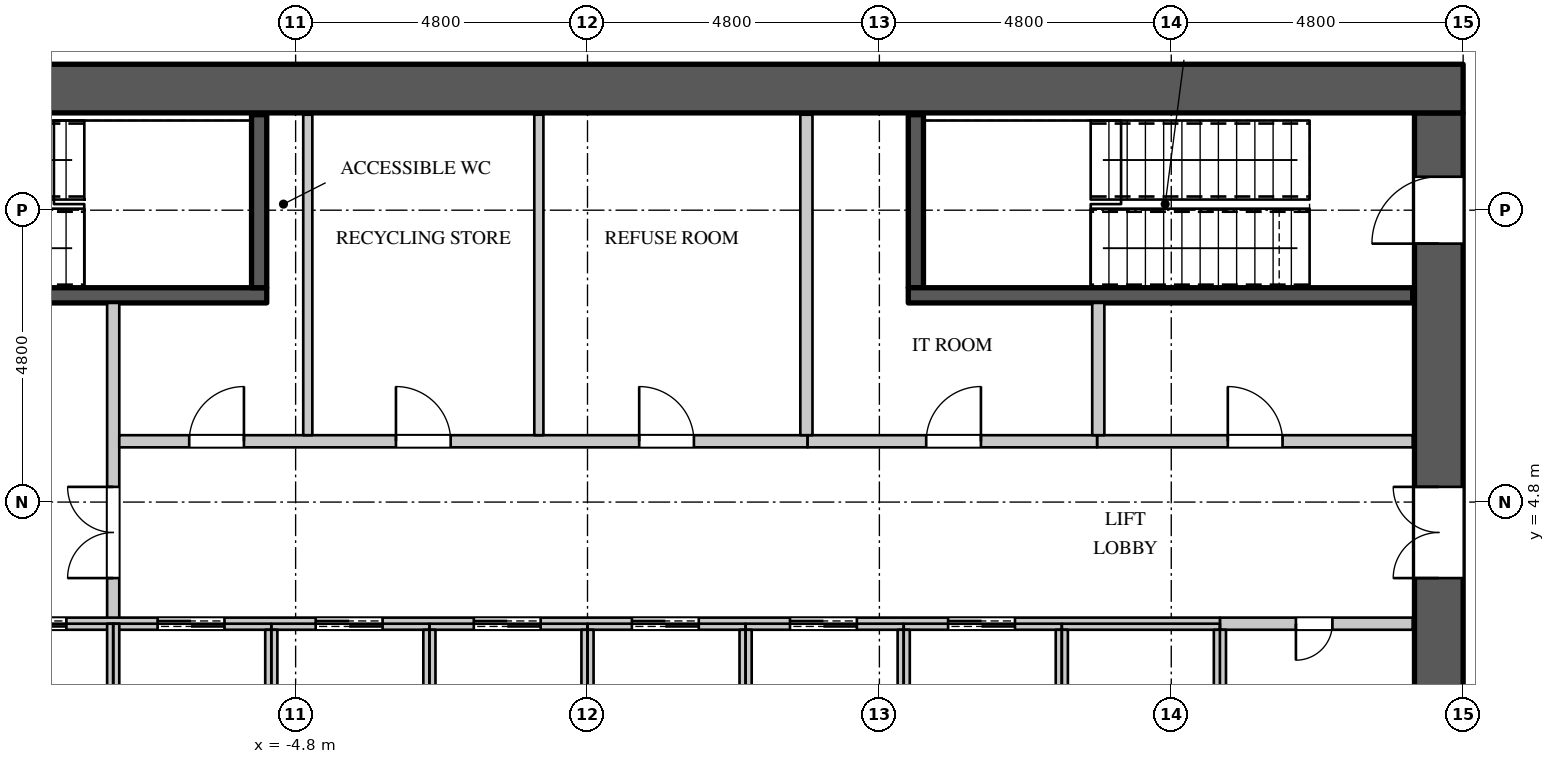
"""IFC4 building model, lengths in metres.
Left out: names, types, materials, properties, quantities, classifications, styles, units other than length and angle.
Written with IfcOpenShell. Run it as: python <this file> out.ifc"""

import sys

from ifc_helpers import new_model, si_unit, direction, frame, frame_2d, origin, place, context, subcontext, project, spatial, rectangle, extrude, element, fill, save


model = new_model("IFC4")
c1 = context("Model", 3, precision=1e-05, world=origin(), true_north=direction((0.0, 1.0)))
c2 = subcontext(c1, "Body", "Model", "MODEL_VIEW")
j1 = project(units=[si_unit("LENGTHUNIT", "METRE"), si_unit("PLANEANGLEUNIT", "RADIAN")], contexts=[c1])
p1 = place(None, origin())
s1 = spatial("IfcSite", under=j1, at=p1, CompositionType="ELEMENT")
p2 = place(p1, origin())
s2 = spatial("IfcBuilding", under=s1, at=p2, CompositionType="ELEMENT")
p3 = place(p2, frame((0.0, 0.0, 119.1)))
s3 = spatial("IfcBuildingStorey", under=s2, at=p3, CompositionType="ELEMENT", Elevation=119.1)
p4 = place(p3, frame((-14.4, 11.6, 0.0), z_axis=(0.0, 0.0, 1.0), x_axis=(1.0, 0.0, 0.0)))
e1 = element("IfcWall", 1, at=p4, inside=s3, PredefinedType="SHEAR", context=c2, shape_type="SweptSolid", body=[
    extrude(rectangle(XDim=28.8, YDim=0.8, at=frame_2d((14.4, 0.0))), origin(), (0.0, 0.0, 1.0), 4.2),
])
p5 = place(p3, frame((14.0, -11.2, 0.0), z_axis=(0.0, 0.0, 1.0), x_axis=(0.0, 1.0, 0.0)))
e2 = element("IfcWall", 2, at=p5, inside=s3, PredefinedType="SHEAR", context=c2, shape_type="SweptSolid", body=[
    extrude(rectangle(XDim=22.4, YDim=0.8, at=frame_2d((11.2, 0.0))), origin(), (0.0, 0.0, 1.0), 4.2),
])
p6 = place(p5, frame((20.25, 0.0, 0.0)))
e3 = element("IfcOpeningElement", 3, at=p6, cuts=e2, PredefinedType="OPENING", context=c2, shape_type="SweptSolid", body=[
    extrude(rectangle(XDim=1.1, YDim=2.2, at=frame_2d((0.55, 1.1))), frame((0.0, 0.41, 0.0), z_axis=(0.0, -1.0, 0.0), x_axis=(1.0, 0.0, 0.0)), (0.0, 0.0, 1.0), 0.82),
])
p7 = place(p5, frame((1.05, 0.0, 0.0)))
e4 = element("IfcOpeningElement", 4, at=p7, cuts=e2, PredefinedType="OPENING", context=c2, shape_type="SweptSolid", body=[
    extrude(rectangle(XDim=1.1, YDim=2.2, at=frame_2d((0.55, 1.1))), frame((0.0, 0.41, 0.0), z_axis=(0.0, -1.0, 0.0), x_axis=(1.0, 0.0, 0.0)), (0.0, 0.0, 1.0), 0.82),
])
p8 = place(p5, frame((14.75, 0.0, 0.0)))
e5 = element("IfcOpeningElement", 5, at=p8, cuts=e2, PredefinedType="OPENING", context=c2, shape_type="SweptSolid", body=[
    extrude(rectangle(XDim=1.5, YDim=2.4, at=frame_2d((0.75, 1.2))), frame((0.0, 0.41, 0.0), z_axis=(0.0, -1.0, 0.0), x_axis=(1.0, 0.0, 0.0)), (0.0, 0.0, 1.0), 0.82),
])
p9 = place(p5, frame((6.15, 0.0, 0.0)))
e6 = element("IfcOpeningElement", 6, at=p9, cuts=e2, PredefinedType="OPENING", context=c2, shape_type="SweptSolid", body=[
    extrude(rectangle(XDim=1.5, YDim=2.4, at=frame_2d((0.75, 1.2))), frame((0.0, 0.41, 0.0), z_axis=(0.0, -1.0, 0.0), x_axis=(1.0, 0.0, 0.0)), (0.0, 0.0, 1.0), 0.82),
])
p10 = place(p3, frame((-7.8, 2.8, 0.0), z_axis=(0.0, 0.0, 1.0), x_axis=(0.0, 1.0, 0.0)))
e7 = element("IfcWall", 7, at=p10, inside=s3, PredefinedType="PARTITIONING", context=c2, shape_type="SweptSolid", body=[
    extrude(rectangle(XDim=5.275, YDim=0.2, at=frame_2d((2.637, 0.0))), origin(), (0.0, 0.0, 1.0), 3.95),
])
p11 = place(p10, frame((0.75, 0.0, 0.0)))
e8 = element("IfcOpeningElement", 8, at=p11, cuts=e7, PredefinedType="OPENING", context=c2, shape_type="SweptSolid", body=[
    extrude(rectangle(XDim=1.5, YDim=2.4, at=frame_2d((0.75, 1.2))), frame((0.0, 0.11, 0.0), z_axis=(0.0, -1.0, 0.0), x_axis=(1.0, 0.0, 0.0)), (0.0, 0.0, 1.0), 0.22),
])
p12 = place(p3, frame((-7.7, 5.8, 0.0), z_axis=(0.0, 0.0, 1.0), x_axis=(1.0, 0.0, 0.0)))
e9 = element("IfcWall", 9, at=p12, inside=s3, PredefinedType="PARTITIONING", context=c2, shape_type="SweptSolid", body=[
    extrude(rectangle(XDim=11.32, YDim=0.2, at=frame_2d((5.66, 0.0))), origin(), (0.0, 0.0, 1.0), 3.95),
])
p13 = place(p12, frame((1.15, 0.0, 0.0)))
e10 = element("IfcOpeningElement", 10, at=p13, cuts=e9, PredefinedType="OPENING", context=c2, shape_type="SweptSolid", body=[
    extrude(rectangle(XDim=0.9, YDim=2.2, at=frame_2d((0.45, 1.1))), frame((0.0, 0.11, 0.0), z_axis=(0.0, -1.0, 0.0), x_axis=(1.0, 0.0, 0.0)), (0.0, 0.0, 1.0), 0.22),
])
p14 = place(p12, frame((4.55, 0.0, 0.0)))
e11 = element("IfcOpeningElement", 11, at=p14, cuts=e9, PredefinedType="OPENING", context=c2, shape_type="SweptSolid", body=[
    extrude(rectangle(XDim=0.9, YDim=2.2, at=frame_2d((0.45, 1.1))), frame((0.0, 0.11, 0.0), z_axis=(0.0, -1.0, 0.0), x_axis=(1.0, 0.0, 0.0)), (0.0, 0.0, 1.0), 0.22),
])
p15 = place(p12, frame((8.55, 0.0, 0.0)))
e12 = element("IfcOpeningElement", 12, at=p15, cuts=e9, PredefinedType="OPENING", context=c2, shape_type="SweptSolid", body=[
    extrude(rectangle(XDim=0.9, YDim=2.2, at=frame_2d((0.45, 1.1))), frame((0.0, 0.11, 0.0), z_axis=(0.0, -1.0, 0.0), x_axis=(1.0, 0.0, 0.0)), (0.0, 0.0, 1.0), 0.22),
])
p16 = place(p3, frame((8.38, 5.8, 0.0), z_axis=(0.0, 0.0, 1.0), x_axis=(1.0, 0.0, 0.0)))
e13 = element("IfcWall", 13, at=p16, inside=s3, PredefinedType="PARTITIONING", context=c2, shape_type="SweptSolid", body=[
    extrude(rectangle(XDim=5.19, YDim=0.2, at=frame_2d((2.595, 0.0))), origin(), (0.0, 0.0, 1.0), 3.95),
])
p17 = place(p16, frame((2.15, 0.0, 0.0)))
e14 = element("IfcOpeningElement", 14, at=p17, cuts=e13, PredefinedType="OPENING", context=c2, shape_type="SweptSolid", body=[
    extrude(rectangle(XDim=0.9, YDim=2.2, at=frame_2d((0.45, 1.1))), frame((0.0, 0.11, 0.0), z_axis=(0.0, -1.0, 0.0), x_axis=(1.0, 0.0, 0.0)), (0.0, 0.0, 1.0), 0.22),
])
for number, where, z_axis, x_axis in (
    (15, (-4.6, 5.9, 0.0), (0.0, 0.0, 1.0), (0.0, 1.0, 0.0)),
    (16, (-0.8, 5.9, 0.0), (0.0, 0.0, 1.0), (0.0, 1.0, 0.0)),
):
    element("IfcWall", number, at=place(p3, frame(where, z_axis=z_axis, x_axis=x_axis)), inside=s3, PredefinedType="PARTITIONING", context=c2, shape_type="SweptSolid", body=[
        extrude(rectangle(XDim=5.27, YDim=0.15, at=frame_2d((2.635, 0.0))), origin(), (0.0, 0.0, 1.0), 3.95),
    ])
p18 = place(p3, frame((3.62, 5.8, 0.0), z_axis=(0.0, 0.0, 1.0), x_axis=(1.0, 0.0, 0.0)))
e17 = element("IfcWall", 17, at=p18, inside=s3, PredefinedType="PARTITIONING", context=c2, shape_type="SweptSolid", body=[
    extrude(rectangle(XDim=4.76, YDim=0.2, at=frame_2d((2.38, 0.0))), origin(), (0.0, 0.0, 1.0), 3.95),
])
p19 = place(p18, frame((1.95, 0.0, 0.0)))
e18 = element("IfcOpeningElement", 18, at=p19, cuts=e17, PredefinedType="OPENING", context=c2, shape_type="SweptSolid", body=[
    extrude(rectangle(XDim=0.9, YDim=2.2, at=frame_2d((0.45, 1.1))), frame((0.0, 0.11, 0.0), z_axis=(0.0, -1.0, 0.0), x_axis=(1.0, 0.0, 0.0)), (0.0, 0.0, 1.0), 0.22),
])
p20 = place(p3, frame((3.6, 5.9, 0.0), z_axis=(0.0, 0.0, 1.0), x_axis=(0.0, 1.0, 0.0)))
e19 = element("IfcWall", 19, at=p20, inside=s3, PredefinedType="PARTITIONING", context=c2, shape_type="SweptSolid", body=[
    extrude(rectangle(XDim=5.27, YDim=0.2, at=frame_2d((2.635, 0.0))), origin(), (0.0, 0.0, 1.0), 3.95),
])
p21 = place(p3, frame((8.4, 5.9, 0.0), z_axis=(0.0, 0.0, 1.0), x_axis=(0.0, 1.0, 0.0)))
e20 = element("IfcWall", 20, at=p21, inside=s3, PredefinedType="PARTITIONING", context=c2, shape_type="SweptSolid", body=[
    extrude(rectangle(XDim=2.175, YDim=0.2, at=frame_2d((1.087, 0.0))), origin(), (0.0, 0.0, 1.0), 3.95),
])
p22 = place(p3, frame((10.4, 2.8, 0.0), z_axis=(0.0, 0.0, 1.0), x_axis=(1.0, 0.0, 0.0)))
e21 = element("IfcWall", 21, at=p22, inside=s3, PredefinedType="PARTITIONING", context=c2, shape_type="SweptSolid", body=[
    extrude(rectangle(XDim=3.17, YDim=0.2, at=frame_2d((1.585, 0.0))), origin(), (0.0, 0.0, 1.0), 3.95),
])
p23 = place(p22, frame((1.25, 0.0, 0.0)))
e22 = element("IfcOpeningElement", 22, at=p23, cuts=e21, PredefinedType="OPENING", context=c2, shape_type="SweptSolid", body=[
    extrude(rectangle(XDim=0.6, YDim=2.0, at=frame_2d((0.3, 1.0))), frame((0.0, 0.11, 0.0), z_axis=(0.0, -1.0, 0.0), x_axis=(1.0, 0.0, 0.0)), (0.0, 0.0, 1.0), 0.22),
])
p24 = place(p3, frame((-13.57, 2.8, 0.0), z_axis=(0.0, 0.0, 1.0), x_axis=(1.0, 0.0, 0.0)))
e23 = element("IfcWall", 23, at=p24, inside=s3, PredefinedType="PARTITIONING", context=c2, shape_type="SweptSolid", body=[
    extrude(rectangle(XDim=23.97, YDim=0.2, at=frame_2d((11.985, 0.0))), origin(), (0.0, 0.0, 1.0), 3.95),
])
p25 = place(p24, frame((1.0, 0.0, 0.0)))
e24 = element("IfcOpeningElement", 24, at=p25, cuts=e23, PredefinedType="OPENING", context=c2, shape_type="SweptSolid", body=[
    extrude(rectangle(XDim=1.1, YDim=2.2, at=frame_2d((0.55, 1.1))), frame((0.0, 0.11, 0.0), z_axis=(0.0, -1.0, 0.0), x_axis=(1.0, 0.0, 0.0)), (0.0, 0.0, 1.0), 0.22),
])
p26 = place(p24, frame((3.9, 0.0, 0.0)))
e25 = element("IfcOpeningElement", 25, at=p26, cuts=e23, PredefinedType="OPENING", context=c2, shape_type="SweptSolid", body=[
    extrude(rectangle(XDim=1.1, YDim=2.2, at=frame_2d((0.55, 1.1))), frame((0.0, 0.11, 0.0), z_axis=(0.0, -1.0, 0.0), x_axis=(1.0, 0.0, 0.0)), (0.0, 0.0, 1.0), 0.22),
])
p27 = place(p24, frame((6.5, 0.0, 0.0)))
e26 = element("IfcOpeningElement", 26, at=p27, cuts=e23, PredefinedType="OPENING", context=c2, shape_type="SweptSolid", body=[
    extrude(rectangle(XDim=1.1, YDim=2.2, at=frame_2d((0.55, 1.1))), frame((0.0, 0.11, 0.0), z_axis=(0.0, -1.0, 0.0), x_axis=(1.0, 0.0, 0.0)), (0.0, 0.0, 1.0), 0.22),
])
p28 = place(p24, frame((9.1, 0.0, 0.0)))
e27 = element("IfcOpeningElement", 27, at=p28, cuts=e23, PredefinedType="OPENING", context=c2, shape_type="SweptSolid", body=[
    extrude(rectangle(XDim=1.1, YDim=2.2, at=frame_2d((0.55, 1.1))), frame((0.0, 0.11, 0.0), z_axis=(0.0, -1.0, 0.0), x_axis=(1.0, 0.0, 0.0)), (0.0, 0.0, 1.0), 0.22),
])
p29 = place(p24, frame((11.7, 0.0, 0.0)))
e28 = element("IfcOpeningElement", 28, at=p29, cuts=e23, PredefinedType="OPENING", context=c2, shape_type="SweptSolid", body=[
    extrude(rectangle(XDim=1.1, YDim=2.2, at=frame_2d((0.55, 1.1))), frame((0.0, 0.11, 0.0), z_axis=(0.0, -1.0, 0.0), x_axis=(1.0, 0.0, 0.0)), (0.0, 0.0, 1.0), 0.22),
])
p30 = place(p24, frame((14.3, 0.0, 0.0)))
e29 = element("IfcOpeningElement", 29, at=p30, cuts=e23, PredefinedType="OPENING", context=c2, shape_type="SweptSolid", body=[
    extrude(rectangle(XDim=1.1, YDim=2.2, at=frame_2d((0.55, 1.1))), frame((0.0, 0.11, 0.0), z_axis=(0.0, -1.0, 0.0), x_axis=(1.0, 0.0, 0.0)), (0.0, 0.0, 1.0), 0.22),
])
p31 = place(p24, frame((16.9, 0.0, 0.0)))
e30 = element("IfcOpeningElement", 30, at=p31, cuts=e23, PredefinedType="OPENING", context=c2, shape_type="SweptSolid", body=[
    extrude(rectangle(XDim=1.1, YDim=2.2, at=frame_2d((0.55, 1.1))), frame((0.0, 0.11, 0.0), z_axis=(0.0, -1.0, 0.0), x_axis=(1.0, 0.0, 0.0)), (0.0, 0.0, 1.0), 0.22),
])
p32 = place(p24, frame((19.5, 0.0, 0.0)))
e31 = element("IfcOpeningElement", 31, at=p32, cuts=e23, PredefinedType="OPENING", context=c2, shape_type="SweptSolid", body=[
    extrude(rectangle(XDim=1.1, YDim=2.2, at=frame_2d((0.55, 1.1))), frame((0.0, 0.11, 0.0), z_axis=(0.0, -1.0, 0.0), x_axis=(1.0, 0.0, 0.0)), (0.0, 0.0, 1.0), 0.22),
])
p33 = place(p3, frame((-7.8, 0.0, 0.0), z_axis=(0.0, 0.0, 1.0), x_axis=(0.0, 1.0, 0.0)))
e32 = element("IfcWall", 32, at=p33, inside=s3, PredefinedType="PARTITIONING", context=c2, shape_type="SweptSolid", body=[
    extrude(rectangle(XDim=2.8, YDim=0.2, at=frame_2d((1.4, 0.0))), origin(), (0.0, 0.0, 1.0), 3.95),
])
for number, where, z_axis, x_axis in (
    (33, (-5.2, 0.1, 0.0), (0.0, 0.0, 1.0), (0.0, 1.0, 0.0)),
    (34, (-2.6, 0.1, 0.0), (0.0, 0.0, 1.0), (0.0, 1.0, 0.0)),
    (35, (0.0, 0.1, 0.0), (0.0, 0.0, 1.0), (0.0, 1.0, 0.0)),
    (36, (2.6, 0.1, 0.0), (0.0, 0.0, 1.0), (0.0, 1.0, 0.0)),
    (37, (5.2, 0.1, 0.0), (0.0, 0.0, 1.0), (0.0, 1.0, 0.0)),
):
    element("IfcWall", number, at=place(p3, frame(where, z_axis=z_axis, x_axis=x_axis)), inside=s3, PredefinedType="PARTITIONING", context=c2, shape_type="SweptSolid", body=[
        extrude(rectangle(XDim=2.6, YDim=0.2, at=frame_2d((1.3, 0.0))), origin(), (0.0, 0.0, 1.0), 3.95),
    ])
p34 = place(p3, frame((7.8, 0.0, 0.0), z_axis=(0.0, 0.0, 1.0), x_axis=(0.0, 1.0, 0.0)))
e38 = element("IfcWall", 38, at=p34, inside=s3, PredefinedType="PARTITIONING", context=c2, shape_type="SweptSolid", body=[
    extrude(rectangle(XDim=2.7, YDim=0.2, at=frame_2d((1.35, 0.0))), origin(), (0.0, 0.0, 1.0), 3.95),
])
p35 = place(p3, frame((10.4, -2.7, 0.0), z_axis=(0.0, 0.0, 1.0), x_axis=(0.0, 1.0, 0.0)))
e39 = element("IfcWall", 39, at=p35, inside=s3, PredefinedType="PARTITIONING", context=c2, shape_type="SweptSolid", body=[
    extrude(rectangle(XDim=5.4, YDim=0.2, at=frame_2d((2.7, 0.0))), origin(), (0.0, 0.0, 1.0), 3.95),
])
p36 = place(p3, frame((-13.57, 8.2, 0.0), z_axis=(0.0, 0.0, 1.0), x_axis=(1.0, 0.0, 0.0)))
e40 = element("IfcWall", 40, at=p36, inside=s3, PredefinedType="SHEAR", context=c2, shape_type="SweptSolid", body=[
    extrude(rectangle(XDim=8.295, YDim=0.25, at=frame_2d((4.147, 0.0))), origin(), (0.0, 0.0, 1.0), 3.95),
])
p37 = place(p36, frame((0.15, 0.0, 0.0)))
e41 = element("IfcOpeningElement", 41, at=p37, cuts=e40, PredefinedType="OPENING", context=c2, shape_type="SweptSolid", body=[
    extrude(rectangle(XDim=1.1, YDim=2.2, at=frame_2d((0.55, 1.1))), frame((0.0, 0.135, 0.0), z_axis=(0.0, -1.0, 0.0), x_axis=(1.0, 0.0, 0.0)), (0.0, 0.0, 1.0), 0.27),
])
for number, where, z_axis, x_axis in (
    (42, (-5.4, 8.325, 0.0), (0.0, 0.0, 1.0), (0.0, 1.0, 0.0)),
    (43, (5.4, 8.325, 0.0), (0.0, 0.0, 1.0), (0.0, 1.0, 0.0)),
):
    element("IfcWall", number, at=place(p3, frame(where, z_axis=z_axis, x_axis=x_axis)), inside=s3, PredefinedType="SHEAR", context=c2, shape_type="SweptSolid", body=[
        extrude(rectangle(XDim=2.845, YDim=0.25, at=frame_2d((1.422, 0.0))), origin(), (0.0, 0.0, 1.0), 3.95),
    ])
p38 = place(p3, frame((5.275, 8.2, 0.0), z_axis=(0.0, 0.0, 1.0), x_axis=(1.0, 0.0, 0.0)))
e44 = element("IfcWall", 44, at=p38, inside=s3, PredefinedType="SHEAR", context=c2, shape_type="SweptSolid", body=[
    extrude(rectangle(XDim=8.295, YDim=0.25, at=frame_2d((4.147, 0.0))), origin(), (0.0, 0.0, 1.0), 3.95),
])
p39 = place(p23, origin())
e45 = element("IfcDoor", 45, at=p39, inside=s3, OperationType="SINGLE_SWING_RIGHT", PredefinedType="DOOR", context=c2, shape_type="SweptSolid", body=[
    extrude(rectangle(XDim=0.6, YDim=2.0, at=frame_2d((0.3, 1.0))), frame((0.0, 0.025, 0.0), z_axis=(0.0, -1.0, 0.0), x_axis=(1.0, 0.0, 0.0)), (0.0, 0.0, 1.0), 0.05),
])
fill(e22, e45)
p40 = place(p13, origin())
e46 = element("IfcDoor", 46, at=p40, inside=s3, OperationType="SINGLE_SWING_RIGHT", PredefinedType="DOOR", context=c2, shape_type="SweptSolid", body=[
    extrude(rectangle(XDim=0.9, YDim=2.2, at=frame_2d((0.45, 1.1))), frame((0.0, 0.025, 0.0), z_axis=(0.0, -1.0, 0.0), x_axis=(1.0, 0.0, 0.0)), (0.0, 0.0, 1.0), 0.05),
])
fill(e10, e46)
p41 = place(p14, origin())
e47 = element("IfcDoor", 47, at=p41, inside=s3, OperationType="SINGLE_SWING_LEFT", PredefinedType="DOOR", context=c2, shape_type="SweptSolid", body=[
    extrude(rectangle(XDim=0.9, YDim=2.2, at=frame_2d((0.45, 1.1))), frame((0.0, 0.025, 0.0), z_axis=(0.0, -1.0, 0.0), x_axis=(1.0, 0.0, 0.0)), (0.0, 0.0, 1.0), 0.05),
])
fill(e11, e47)
p42 = place(p15, origin())
e48 = element("IfcDoor", 48, at=p42, inside=s3, OperationType="SINGLE_SWING_LEFT", PredefinedType="DOOR", context=c2, shape_type="SweptSolid", body=[
    extrude(rectangle(XDim=0.9, YDim=2.2, at=frame_2d((0.45, 1.1))), frame((0.0, 0.025, 0.0), z_axis=(0.0, -1.0, 0.0), x_axis=(1.0, 0.0, 0.0)), (0.0, 0.0, 1.0), 0.05),
])
fill(e12, e48)
p43 = place(p19, origin())
e49 = element("IfcDoor", 49, at=p43, inside=s3, OperationType="SINGLE_SWING_RIGHT", PredefinedType="DOOR", context=c2, shape_type="SweptSolid", body=[
    extrude(rectangle(XDim=0.9, YDim=2.2, at=frame_2d((0.45, 1.1))), frame((0.0, 0.025, 0.0), z_axis=(0.0, -1.0, 0.0), x_axis=(1.0, 0.0, 0.0)), (0.0, 0.0, 1.0), 0.05),
])
fill(e18, e49)
p44 = place(p17, origin())
e50 = element("IfcDoor", 50, at=p44, inside=s3, OperationType="SINGLE_SWING_LEFT", PredefinedType="DOOR", context=c2, shape_type="SweptSolid", body=[
    extrude(rectangle(XDim=0.9, YDim=2.2, at=frame_2d((0.45, 1.1))), frame((0.0, 0.025, 0.0), z_axis=(0.0, -1.0, 0.0), x_axis=(1.0, 0.0, 0.0)), (0.0, 0.0, 1.0), 0.05),
])
fill(e14, e50)
p45 = place(p26, origin())
e51 = element("IfcDoor", 51, at=p45, inside=s3, OperationType="DOUBLE_DOOR_SLIDING", PredefinedType="DOOR", context=c2, shape_type="SweptSolid", body=[
    extrude(rectangle(XDim=1.1, YDim=2.2, at=frame_2d((0.55, 1.1))), frame((0.0, 0.025, 0.0), z_axis=(0.0, -1.0, 0.0), x_axis=(1.0, 0.0, 0.0)), (0.0, 0.0, 1.0), 0.05),
])
fill(e25, e51)
p46 = place(p27, origin())
e52 = element("IfcDoor", 52, at=p46, inside=s3, OperationType="DOUBLE_DOOR_SLIDING", PredefinedType="DOOR", context=c2, shape_type="SweptSolid", body=[
    extrude(rectangle(XDim=1.1, YDim=2.2, at=frame_2d((0.55, 1.1))), frame((0.0, 0.025, 0.0), z_axis=(0.0, -1.0, 0.0), x_axis=(1.0, 0.0, 0.0)), (0.0, 0.0, 1.0), 0.05),
])
fill(e26, e52)
p47 = place(p28, origin())
e53 = element("IfcDoor", 53, at=p47, inside=s3, OperationType="DOUBLE_DOOR_SLIDING", PredefinedType="DOOR", context=c2, shape_type="SweptSolid", body=[
    extrude(rectangle(XDim=1.1, YDim=2.2, at=frame_2d((0.55, 1.1))), frame((0.0, 0.025, 0.0), z_axis=(0.0, -1.0, 0.0), x_axis=(1.0, 0.0, 0.0)), (0.0, 0.0, 1.0), 0.05),
])
fill(e27, e53)
p48 = place(p29, origin())
e54 = element("IfcDoor", 54, at=p48, inside=s3, OperationType="DOUBLE_DOOR_SLIDING", PredefinedType="DOOR", context=c2, shape_type="SweptSolid", body=[
    extrude(rectangle(XDim=1.1, YDim=2.2, at=frame_2d((0.55, 1.1))), frame((0.0, 0.025, 0.0), z_axis=(0.0, -1.0, 0.0), x_axis=(1.0, 0.0, 0.0)), (0.0, 0.0, 1.0), 0.05),
])
fill(e28, e54)
p49 = place(p30, origin())
e55 = element("IfcDoor", 55, at=p49, inside=s3, OperationType="DOUBLE_DOOR_SLIDING", PredefinedType="DOOR", context=c2, shape_type="SweptSolid", body=[
    extrude(rectangle(XDim=1.1, YDim=2.2, at=frame_2d((0.55, 1.1))), frame((0.0, 0.025, 0.0), z_axis=(0.0, -1.0, 0.0), x_axis=(1.0, 0.0, 0.0)), (0.0, 0.0, 1.0), 0.05),
])
fill(e29, e55)
p50 = place(p31, origin())
e56 = element("IfcDoor", 56, at=p50, inside=s3, OperationType="DOUBLE_DOOR_SLIDING", PredefinedType="DOOR", context=c2, shape_type="SweptSolid", body=[
    extrude(rectangle(XDim=1.1, YDim=2.2, at=frame_2d((0.55, 1.1))), frame((0.0, 0.025, 0.0), z_axis=(0.0, -1.0, 0.0), x_axis=(1.0, 0.0, 0.0)), (0.0, 0.0, 1.0), 0.05),
])
fill(e30, e56)
p51 = place(p32, origin())
e57 = element("IfcDoor", 57, at=p51, inside=s3, OperationType="DOUBLE_DOOR_SLIDING", PredefinedType="DOOR", context=c2, shape_type="SweptSolid", body=[
    extrude(rectangle(XDim=1.1, YDim=2.2, at=frame_2d((0.55, 1.1))), frame((0.0, 0.025, 0.0), z_axis=(0.0, -1.0, 0.0), x_axis=(1.0, 0.0, 0.0)), (0.0, 0.0, 1.0), 0.05),
])
fill(e31, e57)
p52 = place(p11, origin())
e58 = element("IfcDoor", 58, at=p52, inside=s3, OperationType="DOUBLE_DOOR_SINGLE_SWING", PredefinedType="DOOR", context=c2, shape_type="SweptSolid", body=[
    extrude(rectangle(XDim=1.5, YDim=2.4, at=frame_2d((0.75, 1.2))), frame((0.0, 0.025, 0.0), z_axis=(0.0, -1.0, 0.0), x_axis=(1.0, 0.0, 0.0)), (0.0, 0.0, 1.0), 0.05),
])
fill(e8, e58)
p53 = place(p6, origin())
e59 = element("IfcDoor", 59, at=p53, inside=s3, OperationType="SINGLE_SWING_LEFT", PredefinedType="DOOR", context=c2, shape_type="SweptSolid", body=[
    extrude(rectangle(XDim=1.1, YDim=2.2, at=frame_2d((0.55, 1.1))), frame((0.0, 0.395, 0.0), z_axis=(0.0, -1.0, 0.0), x_axis=(1.0, 0.0, 0.0)), (0.0, 0.0, 1.0), 0.05),
])
fill(e3, e59)
p54 = place(p8, origin())
e60 = element("IfcDoor", 60, at=p54, inside=s3, OperationType="DOUBLE_DOOR_SINGLE_SWING", PredefinedType="DOOR", context=c2, shape_type="SweptSolid", body=[
    extrude(rectangle(XDim=1.5, YDim=2.4, at=frame_2d((0.75, 1.2))), frame((0.0, 0.395, 0.0), z_axis=(0.0, -1.0, 0.0), x_axis=(1.0, 0.0, 0.0)), (0.0, 0.0, 1.0), 0.05),
])
fill(e5, e60)
save(model, sys.argv[1])
